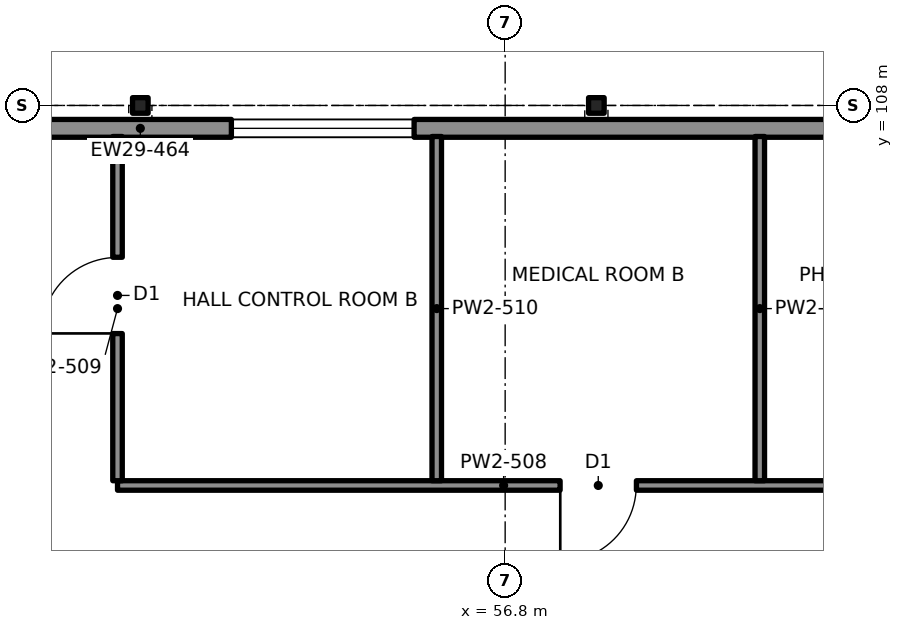
"""IFC4 building model, lengths in metres.
Left out: names, types, materials, properties, quantities, classifications, styles, units other than length and angle.
Written with IfcOpenShell. Run it as: python <this file> out.ifc"""

import sys

from ifc_helpers import new_model, si_unit, direction, frame, frame_2d, origin, origin_2d, place, context, subcontext, project, spatial, rectangle, i_section, extrude, element, fill, save


model = new_model("IFC4")
c1 = context("Model", 3, precision=1e-05, world=origin(), true_north=direction((0.0, 1.0)))
c2 = subcontext(c1, "Body", "Model", "MODEL_VIEW")
j1 = project(units=[si_unit("LENGTHUNIT", "METRE"), si_unit("PLANEANGLEUNIT", "RADIAN")], contexts=[c1])
p1 = place(None, origin())
s1 = spatial("IfcSite", under=j1, at=p1, CompositionType="ELEMENT")
p2 = place(p1, origin())
s2 = spatial("IfcBuilding", under=s1, at=p2, CompositionType="ELEMENT")
p3 = place(p2, frame((0.0, 0.0, 4.4)))
s3 = spatial("IfcBuildingStorey", under=s2, at=p3, CompositionType="ELEMENT", Elevation=4.4)
for number, where, z_axis, x_axis in (
    (1, (52.0, 108.0, 0.0), (0.0, 0.0, 1.0), (1.0, 0.0, 0.0)),
    (2, (58.0, 108.0, 0.0), (0.0, 0.0, 1.0), (1.0, 0.0, 0.0)),
):
    element("IfcColumn", number, at=place(p3, frame(where, z_axis=z_axis, x_axis=x_axis)), inside=s3, PredefinedType="COLUMN", context=c2, shape_type="SweptSolid", body=[
        extrude(i_section(OverallWidth=0.205, OverallDepth=0.31, WebThickness=0.01, FlangeThickness=0.016, at=origin_2d()), origin(), (0.0, 0.0, 1.0), 4.25),
    ])
p4 = place(p3, frame((26.8, 107.699, 0.0), z_axis=(0.0, 0.0, 1.0), x_axis=(1.0, 0.0, 0.0)))
e3 = element("IfcWall", 3, at=p4, inside=s3, PredefinedType="SOLIDWALL", context=c2, shape_type="SweptSolid", body=[
    extrude(rectangle(XDim=50.4, YDim=0.234, at=frame_2d((25.2, 0.0))), origin(), (0.0, 0.0, 1.0), 4.4),
])
p5 = place(p4, frame((2.8, 0.0, 1.0)))
e4 = element("IfcOpeningElement", 4, at=p5, cuts=e3, PredefinedType="OPENING", context=c2, shape_type="SweptSolid", body=[
    extrude(rectangle(XDim=2.4, YDim=2.4, at=frame_2d((1.2, 1.2))), frame((0.0, 0.127, 0.0), z_axis=(0.0, -1.0, 0.0), x_axis=(1.0, 0.0, 0.0)), (0.0, 0.0, 1.0), 0.254),
])
p6 = place(p4, frame((9.6, 0.0, 1.0)))
e5 = element("IfcOpeningElement", 5, at=p6, cuts=e3, PredefinedType="OPENING", context=c2, shape_type="SweptSolid", body=[
    extrude(rectangle(XDim=2.4, YDim=2.4, at=frame_2d((1.2, 1.2))), frame((0.0, 0.127, 0.0), z_axis=(0.0, -1.0, 0.0), x_axis=(1.0, 0.0, 0.0)), (0.0, 0.0, 1.0), 0.254),
])
p7 = place(p4, frame((21.6, 0.0, 1.0)))
e6 = element("IfcOpeningElement", 6, at=p7, cuts=e3, PredefinedType="OPENING", context=c2, shape_type="SweptSolid", body=[
    extrude(rectangle(XDim=2.4, YDim=2.4, at=frame_2d((1.2, 1.2))), frame((0.0, 0.127, 0.0), z_axis=(0.0, -1.0, 0.0), x_axis=(1.0, 0.0, 0.0)), (0.0, 0.0, 1.0), 0.254),
])
p8 = place(p4, frame((26.4, 0.0, 1.0)))
e7 = element("IfcOpeningElement", 7, at=p8, cuts=e3, PredefinedType="OPENING", context=c2, shape_type="SweptSolid", body=[
    extrude(rectangle(XDim=2.4, YDim=2.4, at=frame_2d((1.2, 1.2))), frame((0.0, 0.127, 0.0), z_axis=(0.0, -1.0, 0.0), x_axis=(1.0, 0.0, 0.0)), (0.0, 0.0, 1.0), 0.254),
])
p9 = place(p4, frame((38.4, 0.0, 1.0)))
e8 = element("IfcOpeningElement", 8, at=p9, cuts=e3, PredefinedType="OPENING", context=c2, shape_type="SweptSolid", body=[
    extrude(rectangle(XDim=2.4, YDim=2.4, at=frame_2d((1.2, 1.2))), frame((0.0, 0.127, 0.0), z_axis=(0.0, -1.0, 0.0), x_axis=(1.0, 0.0, 0.0)), (0.0, 0.0, 1.0), 0.254),
])
p10 = place(p4, frame((44.8, 0.0, 1.0)))
e9 = element("IfcOpeningElement", 9, at=p10, cuts=e3, PredefinedType="OPENING", context=c2, shape_type="SweptSolid", body=[
    extrude(rectangle(XDim=2.4, YDim=2.4, at=frame_2d((1.2, 1.2))), frame((0.0, 0.127, 0.0), z_axis=(0.0, -1.0, 0.0), x_axis=(1.0, 0.0, 0.0)), (0.0, 0.0, 1.0), 0.254),
])
p11 = place(p3, frame((51.7, 103.0, 0.0), z_axis=(0.0, 0.0, 1.0), x_axis=(1.0, 0.0, 0.0)))
e10 = element("IfcWall", 10, at=p11, inside=s3, PredefinedType="PARTITIONING", context=c2, shape_type="SweptSolid", body=[
    extrude(rectangle(XDim=12.7, YDim=0.125, at=frame_2d((6.35, 0.0))), origin(), (0.0, 0.0, 1.0), 3.65),
])
p12 = place(p11, frame((5.825, 0.0, 0.0)))
e11 = element("IfcOpeningElement", 11, at=p12, cuts=e10, PredefinedType="OPENING", context=c2, shape_type="SweptSolid", body=[
    extrude(rectangle(XDim=1.0, YDim=2.1, at=frame_2d((0.5, 1.05))), frame((0.0, 0.073, 0.0), z_axis=(0.0, -1.0, 0.0), x_axis=(1.0, 0.0, 0.0)), (0.0, 0.0, 1.0), 0.145),
])
p13 = place(p11, frame((10.075, 0.0, 0.0)))
e12 = element("IfcOpeningElement", 12, at=p13, cuts=e10, PredefinedType="OPENING", context=c2, shape_type="SweptSolid", body=[
    extrude(rectangle(XDim=1.0, YDim=2.1, at=frame_2d((0.5, 1.05))), frame((0.0, 0.073, 0.0), z_axis=(0.0, -1.0, 0.0), x_axis=(1.0, 0.0, 0.0)), (0.0, 0.0, 1.0), 0.145),
])
p14 = place(p3, frame((51.7, 103.062, 0.0), z_axis=(0.0, 0.0, 1.0), x_axis=(0.0, 1.0, 0.0)))
e13 = element("IfcWall", 13, at=p14, inside=s3, PredefinedType="PARTITIONING", context=c2, shape_type="SweptSolid", body=[
    extrude(rectangle(XDim=4.529, YDim=0.125, at=frame_2d((2.265, 0.0))), origin(), (0.0, 0.0, 1.0), 3.65),
])
p15 = place(p14, frame((1.938, 0.0, 0.0)))
e14 = element("IfcOpeningElement", 14, at=p15, cuts=e13, PredefinedType="OPENING", context=c2, shape_type="SweptSolid", body=[
    extrude(rectangle(XDim=1.0, YDim=2.1, at=frame_2d((0.5, 1.05))), frame((0.0, 0.073, 0.0), z_axis=(0.0, -1.0, 0.0), x_axis=(1.0, 0.0, 0.0)), (0.0, 0.0, 1.0), 0.145),
])
for number, where, z_axis, x_axis in (
    (15, (55.9, 103.062, 0.0), (0.0, 0.0, 1.0), (0.0, 1.0, 0.0)),
    (16, (60.15, 103.062, 0.0), (0.0, 0.0, 1.0), (0.0, 1.0, 0.0)),
):
    element("IfcWall", number, at=place(p3, frame(where, z_axis=z_axis, x_axis=x_axis)), inside=s3, PredefinedType="PARTITIONING", context=c2, shape_type="SweptSolid", body=[
        extrude(rectangle(XDim=4.529, YDim=0.125, at=frame_2d((2.265, 0.0))), origin(), (0.0, 0.0, 1.0), 3.65),
    ])
p16 = place(p8, origin())
e17 = element("IfcWindow", 17, at=p16, inside=s3, PartitioningType="SINGLE_PANEL", PredefinedType="WINDOW", context=c2, shape_type="SweptSolid", body=[
    extrude(rectangle(XDim=2.4, YDim=2.4, at=frame_2d((1.2, 1.2))), frame((0.0, 0.03, 0.0), z_axis=(0.0, -1.0, 0.0), x_axis=(1.0, 0.0, 0.0)), (0.0, 0.0, 1.0), 0.06),
])
fill(e7, e17)
p17 = place(p15, origin())
e18 = element("IfcDoor", 18, at=p17, inside=s3, OperationType="SINGLE_SWING_LEFT", PredefinedType="DOOR", context=c2, shape_type="SweptSolid", body=[
    extrude(rectangle(XDim=1.0, YDim=2.1, at=frame_2d((0.5, 1.05))), frame((0.0, 0.025, 0.0), z_axis=(0.0, -1.0, 0.0), x_axis=(1.0, 0.0, 0.0)), (0.0, 0.0, 1.0), 0.05),
])
fill(e14, e18)
p18 = place(p12, origin())
e19 = element("IfcDoor", 19, at=p18, inside=s3, OperationType="SINGLE_SWING_LEFT", PredefinedType="DOOR", context=c2, shape_type="SweptSolid", body=[
    extrude(rectangle(XDim=1.0, YDim=2.1, at=frame_2d((0.5, 1.05))), frame((0.0, 0.025, 0.0), z_axis=(0.0, -1.0, 0.0), x_axis=(1.0, 0.0, 0.0)), (0.0, 0.0, 1.0), 0.05),
])
fill(e11, e19)
save(model, sys.argv[1])
